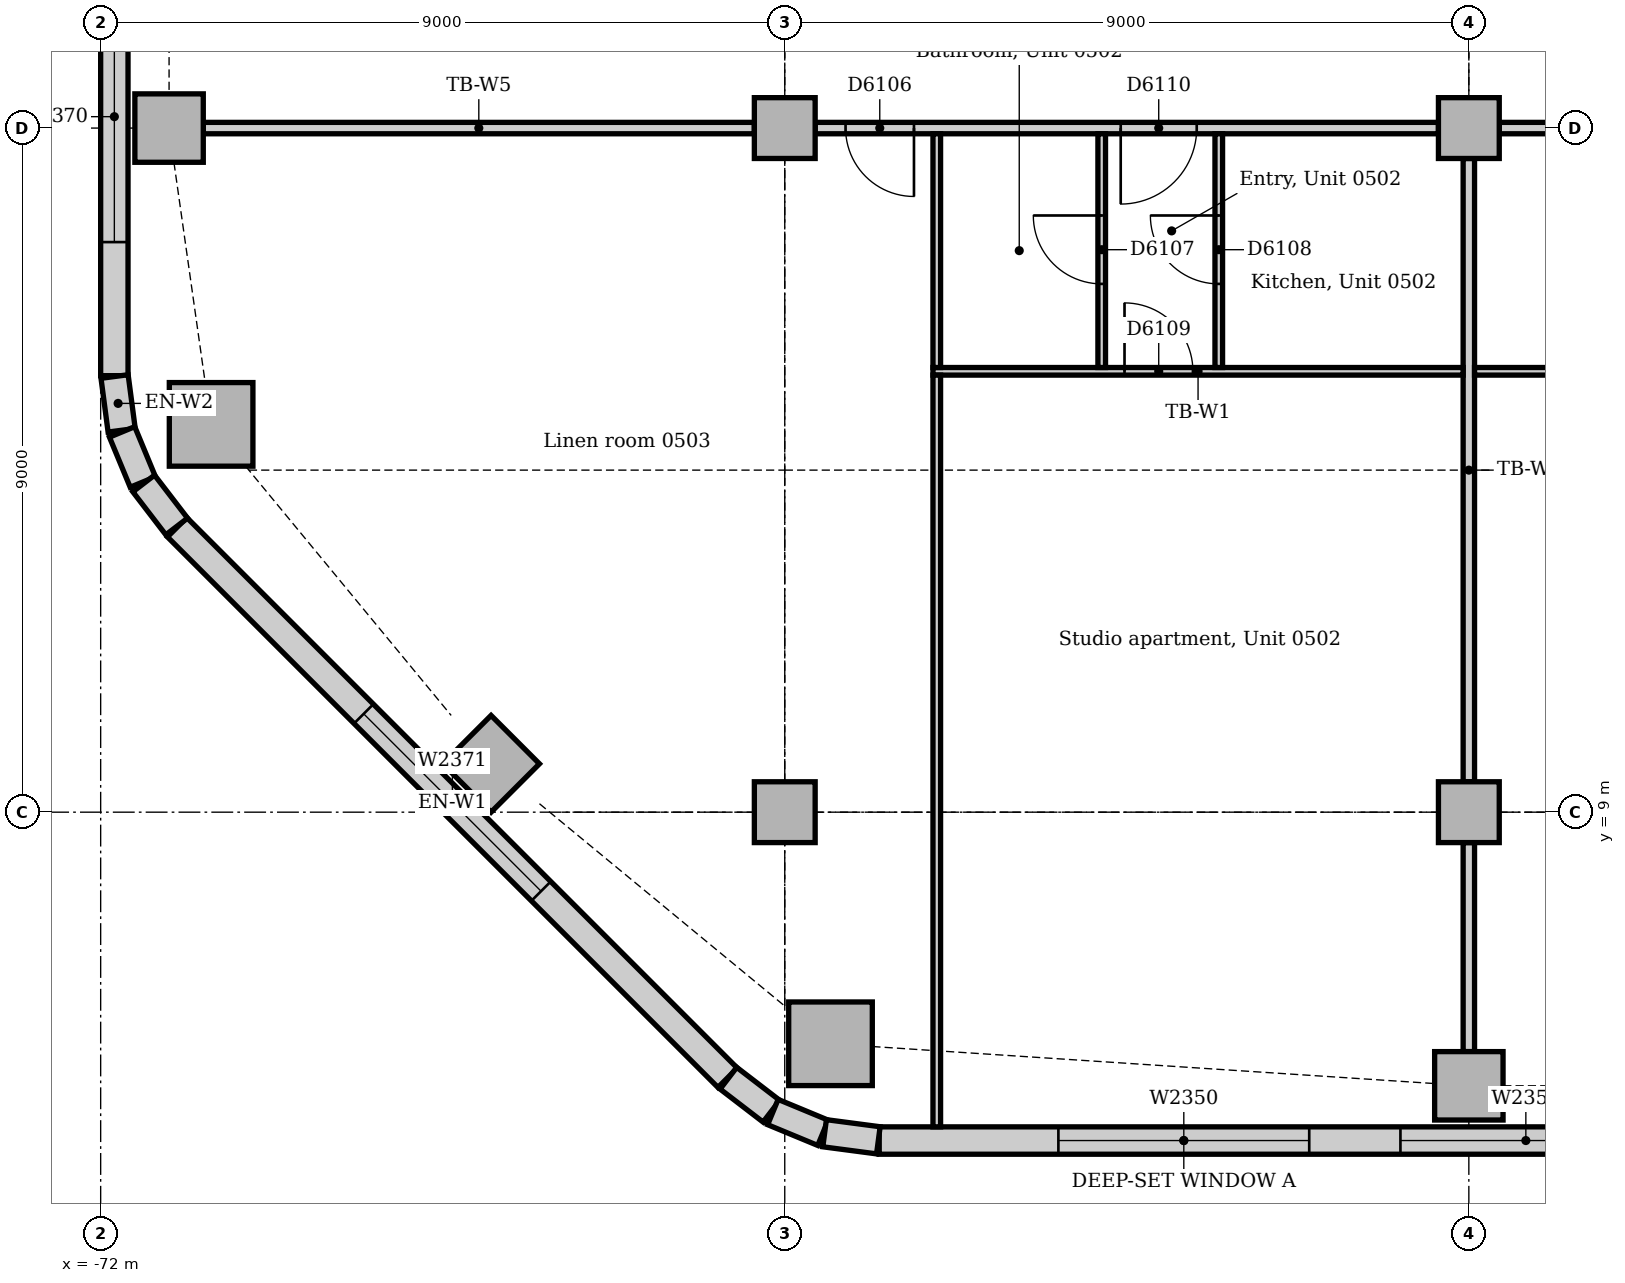
"""IFC4 building model, lengths in metres.
Left out: names, types, materials, properties, quantities, classifications, styles, units other than length and angle.
Written with IfcOpenShell. Run it as: python <this file> out.ifc"""

import sys

from ifc_helpers import new_model, si_unit, direction, frame, frame_2d, origin, origin_2d, place, context, subcontext, project, spatial, rectangle, extrude, element, fill, save


model = new_model("IFC4")
c1 = context("Model", 3, precision=1e-05, world=origin(), true_north=direction((0.0, 1.0)))
c2 = subcontext(c1, "Body", "Model", "MODEL_VIEW")
j1 = project(units=[si_unit("LENGTHUNIT", "METRE"), si_unit("PLANEANGLEUNIT", "RADIAN")], contexts=[c1])
p1 = place(None, origin())
s1 = spatial("IfcSite", under=j1, at=p1, CompositionType="ELEMENT")
p2 = place(p1, origin())
s2 = spatial("IfcBuilding", under=s1, at=p2, CompositionType="ELEMENT")
p3 = place(p2, frame((0.0, 0.0, 26.0)))
s3 = spatial("IfcBuildingStorey", under=s2, at=p3, CompositionType="ELEMENT", Elevation=26.0)
for number, where, z_axis, x_axis in (
    (1, (-62.398, 5.953, 0.0), (0.0, 0.0, 1.0), (1.0, 0.0, 0.0)),
    (2, (-70.547, 14.102, 0.0), (0.0, 0.0, 1.0), (1.0, 0.0, 0.0)),
):
    element("IfcColumn", number, at=place(p3, frame(where, z_axis=z_axis, x_axis=x_axis)), inside=s3, PredefinedType="COLUMN", context=c2, shape_type="SweptSolid", body=[
        extrude(rectangle(XDim=1.1, YDim=1.1, at=origin_2d()), origin(), (0.0, 0.0, 1.0), 3.85),
    ])
for number, where, z_axis, x_axis in (
    (3, (-54.0, 5.4, 0.0), (0.0, 0.0, 1.0), (1.0, 0.0, 0.0)),
    (4, (-71.1, 18.0, 0.0), (0.0, 0.0, 1.0), (1.0, 0.0, 0.0)),
    (5, (-66.864, 9.636, 0.0), (0.0, 0.0, 1.0), (0.707, 0.707, 0.0)),
):
    element("IfcColumn", number, at=place(p3, frame(where, z_axis=z_axis, x_axis=x_axis)), inside=s3, PredefinedType="COLUMN", context=c2, shape_type="SweptSolid", body=[
        extrude(rectangle(XDim=0.9, YDim=0.9, at=origin_2d()), origin(), (0.0, 0.0, 1.0), 3.85),
    ])
for number, where, z_axis, x_axis in (
    (6, (-63.0, 9.0, 0.0), (0.0, 0.0, 1.0), (1.0, 0.0, 0.0)),
    (7, (-63.0, 18.0, 0.0), (0.0, 0.0, 1.0), (1.0, 0.0, 0.0)),
    (8, (-54.0, 9.0, 0.0), (0.0, 0.0, 1.0), (1.0, 0.0, 0.0)),
    (9, (-54.0, 18.0, 0.0), (0.0, 0.0, 1.0), (1.0, 0.0, 0.0)),
):
    element("IfcColumn", number, at=place(p3, frame(where, z_axis=z_axis, x_axis=x_axis)), inside=s3, PredefinedType="COLUMN", context=c2, shape_type="SweptSolid", body=[
        extrude(rectangle(XDim=0.8, YDim=0.8, at=origin_2d()), origin(), (0.0, 0.0, 1.0), 3.85),
    ])
p4 = place(p3, frame((-61.757, 4.68, 0.0), z_axis=(0.0, 0.0, 1.0), x_axis=(1.0, 0.0, 0.0)))
e10 = element("IfcWall", 10, at=p4, inside=s3, PredefinedType="STANDARD", context=c2, shape_type="SweptSolid", body=[
    extrude(rectangle(XDim=30.515, YDim=0.36, at=frame_2d((15.257, 0.0))), origin(), (0.0, 0.0, 1.0), 3.85),
])
p5 = place(p4, frame((2.357, 0.0, 0.9)))
e11 = element("IfcOpeningElement", 11, at=p5, cuts=e10, PredefinedType="OPENING", context=c2, shape_type="SweptSolid", body=[
    extrude(rectangle(XDim=3.3, YDim=1.6, at=frame_2d((1.65, 0.8))), frame((0.0, 0.19, 0.0), z_axis=(0.0, -1.0, 0.0), x_axis=(1.0, 0.0, 0.0)), (0.0, 0.0, 1.0), 0.38),
])
p6 = place(p4, frame((6.857, 0.0, 0.9)))
e12 = element("IfcOpeningElement", 12, at=p6, cuts=e10, PredefinedType="OPENING", context=c2, shape_type="SweptSolid", body=[
    extrude(rectangle(XDim=3.3, YDim=1.6, at=frame_2d((1.65, 0.8))), frame((0.0, 0.19, 0.0), z_axis=(0.0, -1.0, 0.0), x_axis=(1.0, 0.0, 0.0)), (0.0, 0.0, 1.0), 0.38),
])
p7 = place(p4, frame((11.357, 0.0, 0.9)))
e13 = element("IfcOpeningElement", 13, at=p7, cuts=e10, PredefinedType="OPENING", context=c2, shape_type="SweptSolid", body=[
    extrude(rectangle(XDim=3.3, YDim=1.6, at=frame_2d((1.65, 0.8))), frame((0.0, 0.19, 0.0), z_axis=(0.0, -1.0, 0.0), x_axis=(1.0, 0.0, 0.0)), (0.0, 0.0, 1.0), 0.38),
])
p8 = place(p4, frame((15.857, 0.0, 0.9)))
e14 = element("IfcOpeningElement", 14, at=p8, cuts=e10, PredefinedType="OPENING", context=c2, shape_type="SweptSolid", body=[
    extrude(rectangle(XDim=3.3, YDim=1.6, at=frame_2d((1.65, 0.8))), frame((0.0, 0.19, 0.0), z_axis=(0.0, -1.0, 0.0), x_axis=(1.0, 0.0, 0.0)), (0.0, 0.0, 1.0), 0.38),
])
p9 = place(p4, frame((20.357, 0.0, 0.9)))
e15 = element("IfcOpeningElement", 15, at=p9, cuts=e10, PredefinedType="OPENING", context=c2, shape_type="SweptSolid", body=[
    extrude(rectangle(XDim=3.3, YDim=1.6, at=frame_2d((1.65, 0.8))), frame((0.0, 0.19, 0.0), z_axis=(0.0, -1.0, 0.0), x_axis=(1.0, 0.0, 0.0)), (0.0, 0.0, 1.0), 0.38),
])
p10 = place(p4, frame((24.857, 0.0, 0.9)))
e16 = element("IfcOpeningElement", 16, at=p10, cuts=e10, PredefinedType="OPENING", context=c2, shape_type="SweptSolid", body=[
    extrude(rectangle(XDim=3.3, YDim=1.6, at=frame_2d((1.65, 0.8))), frame((0.0, 0.19, 0.0), z_axis=(0.0, -1.0, 0.0), x_axis=(1.0, 0.0, 0.0)), (0.0, 0.0, 1.0), 0.38),
])
p11 = place(p3, frame((-71.82, 40.757, 0.0), z_axis=(0.0, 0.0, 1.0), x_axis=(0.0, -1.0, 0.0)))
e17 = element("IfcWall", 17, at=p11, inside=s3, PredefinedType="STANDARD", context=c2, shape_type="SweptSolid", body=[
    extrude(rectangle(XDim=26.015, YDim=0.36, at=frame_2d((13.007, 0.0))), origin(), (0.0, 0.0, 1.0), 3.85),
])
p12 = place(p11, frame((2.357, 0.0, 0.9)))
e18 = element("IfcOpeningElement", 18, at=p12, cuts=e17, PredefinedType="OPENING", context=c2, shape_type="SweptSolid", body=[
    extrude(rectangle(XDim=3.3, YDim=1.6, at=frame_2d((1.65, 0.8))), frame((0.0, 0.19, 0.0), z_axis=(0.0, -1.0, 0.0), x_axis=(1.0, 0.0, 0.0)), (0.0, 0.0, 1.0), 0.38),
])
p13 = place(p11, frame((7.057, 0.0, 0.9)))
e19 = element("IfcOpeningElement", 19, at=p13, cuts=e17, PredefinedType="OPENING", context=c2, shape_type="SweptSolid", body=[
    extrude(rectangle(XDim=3.3, YDim=1.6, at=frame_2d((1.65, 0.8))), frame((0.0, 0.19, 0.0), z_axis=(0.0, -1.0, 0.0), x_axis=(1.0, 0.0, 0.0)), (0.0, 0.0, 1.0), 0.38),
])
p14 = place(p11, frame((11.357, 0.0, 0.9)))
e20 = element("IfcOpeningElement", 20, at=p14, cuts=e17, PredefinedType="OPENING", context=c2, shape_type="SweptSolid", body=[
    extrude(rectangle(XDim=3.3, YDim=1.6, at=frame_2d((1.65, 0.8))), frame((0.0, 0.19, 0.0), z_axis=(0.0, -1.0, 0.0), x_axis=(1.0, 0.0, 0.0)), (0.0, 0.0, 1.0), 0.38),
])
p15 = place(p11, frame((15.857, 0.0, 0.9)))
e21 = element("IfcOpeningElement", 21, at=p15, cuts=e17, PredefinedType="OPENING", context=c2, shape_type="SweptSolid", body=[
    extrude(rectangle(XDim=3.3, YDim=1.6, at=frame_2d((1.65, 0.8))), frame((0.0, 0.19, 0.0), z_axis=(0.0, -1.0, 0.0), x_axis=(1.0, 0.0, 0.0)), (0.0, 0.0, 1.0), 0.38),
])
p16 = place(p11, frame((20.957, 0.0, 0.9)))
e22 = element("IfcOpeningElement", 22, at=p16, cuts=e17, PredefinedType="OPENING", context=c2, shape_type="SweptSolid", body=[
    extrude(rectangle(XDim=3.3, YDim=1.6, at=frame_2d((1.65, 0.8))), frame((0.0, 0.19, 0.0), z_axis=(0.0, -1.0, 0.0), x_axis=(1.0, 0.0, 0.0)), (0.0, 0.0, 1.0), 0.38),
])
p17 = place(p3, frame((-70.994, 12.749, 0.0), z_axis=(0.0, 0.0, 1.0), x_axis=(0.707106781187, -0.707106781187, 0.0)))
e23 = element("IfcWall", 23, at=p17, inside=s3, PredefinedType="STANDARD", context=c2, shape_type="SweptSolid", body=[
    extrude(rectangle(XDim=10.243, YDim=0.36, at=frame_2d((5.121, 0.0))), origin(), (0.0, 0.0, 1.0), 3.85),
])
p18 = place(p17, frame((3.471, 0.0, 0.9)))
e24 = element("IfcOpeningElement", 24, at=p18, cuts=e23, PredefinedType="OPENING", context=c2, shape_type="SweptSolid", body=[
    extrude(rectangle(XDim=3.3, YDim=1.6, at=frame_2d((1.65, 0.8))), frame((0.0, 0.19, 0.0), z_axis=(0.0, -1.0, 0.0), x_axis=(1.0, 0.0, 0.0)), (0.0, 0.0, 1.0), 0.38),
])
for number, where, z_axis, x_axis in (
    (25, (-71.817, 14.731, 0.0), (0.0, 0.0, 1.0), (0.131, -0.991, 0.0)),
    (26, (-71.718, 14.003, 0.0), (0.0, 0.0, 1.0), (0.383, -0.924, 0.0)),
):
    element("IfcWall", number, at=place(p3, frame(where, z_axis=z_axis, x_axis=x_axis)), inside=s3, PredefinedType="STANDARD", context=c2, shape_type="SweptSolid", body=[
        extrude(rectangle(XDim=0.713, YDim=0.36, at=frame_2d((0.356, 0.0))), origin(), (0.0, 0.0, 1.0), 3.85),
    ])
for number, where, z_axis, x_axis in (
    (27, (-71.434, 13.325, 0.0), (0.0, 0.0, 1.0), (0.609, -0.793, 0.0)),
    (28, (-63.741, 5.5, 0.0), (0.0, 0.0, 1.0), (0.793, -0.609, 0.0)),
):
    element("IfcWall", number, at=place(p3, frame(where, z_axis=z_axis, x_axis=x_axis)), inside=s3, PredefinedType="STANDARD", context=c2, shape_type="SweptSolid", body=[
        extrude(rectangle(XDim=0.713, YDim=0.36, at=frame_2d((0.357, 0.0))), origin(), (0.0, 0.0, 1.0), 3.85),
    ])
for number, where, z_axis, x_axis in (
    (29, (-63.156, 5.055, 0.0), (0.0, 0.0, 1.0), (0.924, -0.383, 0.0)),
    (30, (-62.476, 4.776, 0.0), (0.0, 0.0, 1.0), (0.991, -0.131, 0.0)),
):
    element("IfcWall", number, at=place(p3, frame(where, z_axis=z_axis, x_axis=x_axis)), inside=s3, PredefinedType="STANDARD", context=c2, shape_type="SweptSolid", body=[
        extrude(rectangle(XDim=0.713, YDim=0.36, at=frame_2d((0.356, 0.0))), origin(), (0.0, 0.0, 1.0), 3.85),
    ])
p19 = place(p3, frame((-53.6, 18.0, 0.0), z_axis=(0.0, 0.0, 1.0), x_axis=(1.0, 0.0, 0.0)))
e31 = element("IfcWall", 31, at=p19, inside=s3, PredefinedType="PARTITIONING", context=c2, shape_type="SweptSolid", body=[
    extrude(rectangle(XDim=8.2, YDim=0.15, at=frame_2d((4.1, 0.0))), origin(), (0.0, 0.0, 1.0), 3.15),
])
p20 = place(p19, frame((2.89, 0.0, 0.0)))
e32 = element("IfcOpeningElement", 32, at=p20, cuts=e31, PredefinedType="OPENING", context=c2, shape_type="SweptSolid", body=[
    extrude(rectangle(XDim=1.0, YDim=2.1, at=frame_2d((0.5, 1.05))), frame((0.0, 0.085, 0.0), z_axis=(0.0, -1.0, 0.0), x_axis=(1.0, 0.0, 0.0)), (0.0, 0.0, 1.0), 0.17),
])
p21 = place(p3, frame((-62.6, 18.0, 0.0), z_axis=(0.0, 0.0, 1.0), x_axis=(1.0, 0.0, 0.0)))
e33 = element("IfcWall", 33, at=p21, inside=s3, PredefinedType="PARTITIONING", context=c2, shape_type="SweptSolid", body=[
    extrude(rectangle(XDim=8.2, YDim=0.15, at=frame_2d((4.1, 0.0))), origin(), (0.0, 0.0, 1.0), 3.15),
])
p22 = place(p21, frame((0.4, 0.0, 0.0)))
e34 = element("IfcOpeningElement", 34, at=p22, cuts=e33, PredefinedType="OPENING", context=c2, shape_type="SweptSolid", body=[
    extrude(rectangle(XDim=0.9, YDim=2.1, at=frame_2d((0.45, 1.05))), frame((0.0, 0.085, 0.0), z_axis=(0.0, -1.0, 0.0), x_axis=(1.0, 0.0, 0.0)), (0.0, 0.0, 1.0), 0.17),
])
p23 = place(p21, frame((4.02, 0.0, 0.0)))
e35 = element("IfcOpeningElement", 35, at=p23, cuts=e33, PredefinedType="OPENING", context=c2, shape_type="SweptSolid", body=[
    extrude(rectangle(XDim=1.0, YDim=2.1, at=frame_2d((0.5, 1.05))), frame((0.0, 0.085, 0.0), z_axis=(0.0, -1.0, 0.0), x_axis=(1.0, 0.0, 0.0)), (0.0, 0.0, 1.0), 0.17),
])
p24 = place(p3, frame((-70.65, 18.0, 0.0), z_axis=(0.0, 0.0, 1.0), x_axis=(1.0, 0.0, 0.0)))
e36 = element("IfcWall", 36, at=p24, inside=s3, PredefinedType="PARTITIONING", context=c2, shape_type="SweptSolid", body=[
    extrude(rectangle(XDim=7.25, YDim=0.15, at=frame_2d((3.625, 0.0))), origin(), (0.0, 0.0, 1.0), 3.15),
])
p25 = place(p3, frame((-54.0, 9.4, 0.0), z_axis=(0.0, 0.0, 1.0), x_axis=(0.0, 1.0, 0.0)))
e37 = element("IfcWall", 37, at=p25, inside=s3, PredefinedType="PARTITIONING", context=c2, shape_type="SweptSolid", body=[
    extrude(rectangle(XDim=8.2, YDim=0.15, at=frame_2d((4.1, 0.0))), origin(), (0.0, 0.0, 1.0), 3.158),
])
p26 = place(p3, frame((-54.0, 5.85, 0.0), z_axis=(0.0, 0.0, 1.0), x_axis=(0.0, 1.0, 0.0)))
e38 = element("IfcWall", 38, at=p26, inside=s3, PredefinedType="PARTITIONING", context=c2, shape_type="SweptSolid", body=[
    extrude(rectangle(XDim=2.75, YDim=0.15, at=frame_2d((1.375, 0.0))), origin(), (0.0, 0.0, 1.0), 3.652),
])
p27 = place(p3, frame((-61.05, 14.8, 0.0), z_axis=(0.0, 0.0, 1.0), x_axis=(1.0, 0.0, 0.0)))
e39 = element("IfcWall", 39, at=p27, inside=s3, PredefinedType="PARTITIONING", context=c2, shape_type="SweptSolid", body=[
    extrude(rectangle(XDim=6.975, YDim=0.1, at=frame_2d((3.487, 0.0))), origin(), (0.0, 0.0, 1.0), 3.85),
])
p28 = place(p27, frame((2.52, 0.0, 0.0)))
e40 = element("IfcOpeningElement", 40, at=p28, cuts=e39, PredefinedType="OPENING", context=c2, shape_type="SweptSolid", body=[
    extrude(rectangle(XDim=0.9, YDim=2.1, at=frame_2d((0.45, 1.05))), frame((0.0, 0.06, 0.0), z_axis=(0.0, -1.0, 0.0), x_axis=(1.0, 0.0, 0.0)), (0.0, 0.0, 1.0), 0.12),
])
p29 = place(p3, frame((-53.925, 14.8, 0.0), z_axis=(0.0, 0.0, 1.0), x_axis=(1.0, 0.0, 0.0)))
e41 = element("IfcWall", 41, at=p29, inside=s3, PredefinedType="PARTITIONING", context=c2, shape_type="SweptSolid", body=[
    extrude(rectangle(XDim=8.85, YDim=0.1, at=frame_2d((4.425, 0.0))), origin(), (0.0, 0.0, 1.0), 3.85),
])
p30 = place(p29, frame((3.265, 0.0, 0.0)))
e42 = element("IfcOpeningElement", 42, at=p30, cuts=e41, PredefinedType="OPENING", context=c2, shape_type="SweptSolid", body=[
    extrude(rectangle(XDim=0.9, YDim=2.1, at=frame_2d((0.45, 1.05))), frame((0.0, 0.06, 0.0), z_axis=(0.0, -1.0, 0.0), x_axis=(1.0, 0.0, 0.0)), (0.0, 0.0, 1.0), 0.12),
])
p31 = place(p3, frame((-61.0, 14.85, 0.0), z_axis=(0.0, 0.0, 1.0), x_axis=(0.0, 1.0, 0.0)))
e43 = element("IfcWall", 43, at=p31, inside=s3, PredefinedType="PARTITIONING", context=c2, shape_type="SweptSolid", body=[
    extrude(rectangle(XDim=3.075, YDim=0.1, at=frame_2d((1.538, 0.0))), origin(), (0.0, 0.0, 1.0), 3.85),
])
p32 = place(p3, frame((-61.0, 4.86, 0.0), z_axis=(0.0, 0.0, 1.0), x_axis=(0.0, 1.0, 0.0)))
e44 = element("IfcWall", 44, at=p32, inside=s3, PredefinedType="PARTITIONING", context=c2, shape_type="SweptSolid", body=[
    extrude(rectangle(XDim=9.89, YDim=0.1, at=frame_2d((4.945, 0.0))), origin(), (0.0, 0.0, 1.0), 3.85),
])
p33 = place(p3, frame((-58.83, 14.85, 0.0), z_axis=(0.0, 0.0, 1.0), x_axis=(0.0, 1.0, 0.0)))
e45 = element("IfcWall", 45, at=p33, inside=s3, PredefinedType="PARTITIONING", context=c2, shape_type="SweptSolid", body=[
    extrude(rectangle(XDim=3.075, YDim=0.1, at=frame_2d((1.538, 0.0))), origin(), (0.0, 0.0, 1.0), 3.85),
])
p34 = place(p33, frame((1.1, 0.0, 0.0)))
e46 = element("IfcOpeningElement", 46, at=p34, cuts=e45, PredefinedType="OPENING", context=c2, shape_type="SweptSolid", body=[
    extrude(rectangle(XDim=0.9, YDim=2.1, at=frame_2d((0.45, 1.05))), frame((0.0, 0.06, 0.0), z_axis=(0.0, -1.0, 0.0), x_axis=(1.0, 0.0, 0.0)), (0.0, 0.0, 1.0), 0.12),
])
p35 = place(p3, frame((-57.29, 14.85, 0.0), z_axis=(0.0, 0.0, 1.0), x_axis=(0.0, 1.0, 0.0)))
e47 = element("IfcWall", 47, at=p35, inside=s3, PredefinedType="PARTITIONING", context=c2, shape_type="SweptSolid", body=[
    extrude(rectangle(XDim=3.075, YDim=0.1, at=frame_2d((1.538, 0.0))), origin(), (0.0, 0.0, 1.0), 3.85),
])
p36 = place(p35, frame((1.1, 0.0, 0.0)))
e48 = element("IfcOpeningElement", 48, at=p36, cuts=e47, PredefinedType="OPENING", context=c2, shape_type="SweptSolid", body=[
    extrude(rectangle(XDim=0.9, YDim=2.1, at=frame_2d((0.45, 1.05))), frame((0.0, 0.06, 0.0), z_axis=(0.0, -1.0, 0.0), x_axis=(1.0, 0.0, 0.0)), (0.0, 0.0, 1.0), 0.12),
])
p37 = place(p5, origin())
e49 = element("IfcWindow", 49, at=p37, inside=s3, PartitioningType="SINGLE_PANEL", PredefinedType="WINDOW", context=c2, shape_type="SweptSolid", body=[
    extrude(rectangle(XDim=3.3, YDim=1.6, at=frame_2d((1.65, 0.8))), frame((0.0, 0.13, 0.0), z_axis=(0.0, -1.0, 0.0), x_axis=(1.0, 0.0, 0.0)), (0.0, 0.0, 1.0), 0.06),
])
fill(e11, e49)
p38 = place(p6, origin())
e50 = element("IfcWindow", 50, at=p38, inside=s3, PartitioningType="SINGLE_PANEL", PredefinedType="WINDOW", context=c2, shape_type="SweptSolid", body=[
    extrude(rectangle(XDim=3.3, YDim=1.6, at=frame_2d((1.65, 0.8))), frame((0.0, 0.13, 0.0), z_axis=(0.0, -1.0, 0.0), x_axis=(1.0, 0.0, 0.0)), (0.0, 0.0, 1.0), 0.06),
])
fill(e12, e50)
p39 = place(p16, origin())
e51 = element("IfcWindow", 51, at=p39, inside=s3, PartitioningType="SINGLE_PANEL", PredefinedType="WINDOW", context=c2, shape_type="SweptSolid", body=[
    extrude(rectangle(XDim=3.3, YDim=1.6, at=frame_2d((1.65, 0.8))), frame((0.0, 0.13, 0.0), z_axis=(0.0, -1.0, 0.0), x_axis=(1.0, 0.0, 0.0)), (0.0, 0.0, 1.0), 0.06),
])
fill(e22, e51)
p40 = place(p18, origin())
e52 = element("IfcWindow", 52, at=p40, inside=s3, PartitioningType="SINGLE_PANEL", PredefinedType="WINDOW", context=c2, shape_type="SweptSolid", body=[
    extrude(rectangle(XDim=3.3, YDim=1.6, at=frame_2d((1.65, 0.8))), frame((0.0, 0.13, 0.0), z_axis=(0.0, -1.0, 0.0), x_axis=(1.0, 0.0, 0.0)), (0.0, 0.0, 1.0), 0.06),
])
fill(e24, e52)
p41 = place(p22, frame((0.9, 0.0, 0.0), z_axis=(0.0, 0.0, 1.0), x_axis=(-1.0, 0.0, 0.0)))
e53 = element("IfcDoor", 53, at=p41, inside=s3, OperationType="SINGLE_SWING_LEFT", PredefinedType="DOOR", context=c2, shape_type="SweptSolid", body=[
    extrude(rectangle(XDim=0.9, YDim=2.1, at=frame_2d((0.45, 1.05))), frame((0.0, 0.025, 0.0), z_axis=(0.0, -1.0, 0.0), x_axis=(1.0, 0.0, 0.0)), (0.0, 0.0, 1.0), 0.05),
])
fill(e34, e53)
p42 = place(p34, origin())
e54 = element("IfcDoor", 54, at=p42, inside=s3, OperationType="SINGLE_SWING_RIGHT", PredefinedType="DOOR", context=c2, shape_type="SweptSolid", body=[
    extrude(rectangle(XDim=0.9, YDim=2.1, at=frame_2d((0.45, 1.05))), frame((0.0, 0.025, 0.0), z_axis=(0.0, -1.0, 0.0), x_axis=(1.0, 0.0, 0.0)), (0.0, 0.0, 1.0), 0.05),
])
fill(e46, e54)
p43 = place(p36, origin())
e55 = element("IfcDoor", 55, at=p43, inside=s3, OperationType="SINGLE_SWING_RIGHT", PredefinedType="DOOR", context=c2, shape_type="SweptSolid", body=[
    extrude(rectangle(XDim=0.9, YDim=2.1, at=frame_2d((0.45, 1.05))), frame((0.0, 0.025, 0.0), z_axis=(0.0, -1.0, 0.0), x_axis=(1.0, 0.0, 0.0)), (0.0, 0.0, 1.0), 0.05),
])
fill(e48, e55)
p44 = place(p28, origin())
e56 = element("IfcDoor", 56, at=p44, inside=s3, OperationType="SINGLE_SWING_LEFT", PredefinedType="DOOR", context=c2, shape_type="SweptSolid", body=[
    extrude(rectangle(XDim=0.9, YDim=2.1, at=frame_2d((0.45, 1.05))), frame((0.0, 0.025, 0.0), z_axis=(0.0, -1.0, 0.0), x_axis=(1.0, 0.0, 0.0)), (0.0, 0.0, 1.0), 0.05),
])
fill(e40, e56)
p45 = place(p23, frame((1.0, 0.0, 0.0), z_axis=(0.0, 0.0, 1.0), x_axis=(-1.0, 0.0, 0.0)))
e57 = element("IfcDoor", 57, at=p45, inside=s3, OperationType="SINGLE_SWING_RIGHT", PredefinedType="DOOR", context=c2, shape_type="SweptSolid", body=[
    extrude(rectangle(XDim=1.0, YDim=2.1, at=frame_2d((0.5, 1.05))), frame((0.0, 0.025, 0.0), z_axis=(0.0, -1.0, 0.0), x_axis=(1.0, 0.0, 0.0)), (0.0, 0.0, 1.0), 0.05),
])
fill(e35, e57)
save(model, sys.argv[1])
